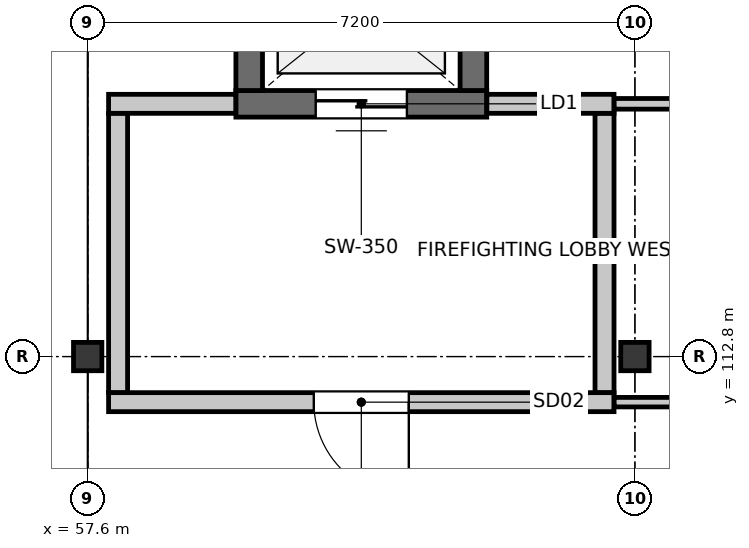
"""IFC4 building model, lengths in metres.
Left out: names, types, materials, properties, quantities, classifications, styles, units other than length and angle.
Written with IfcOpenShell. Run it as: python <this file> out.ifc"""

import sys

from ifc_helpers import new_model, si_unit, direction, frame, frame_2d, origin, origin_2d, place, context, subcontext, project, spatial, rectangle, i_section, extrude, element, fill, save


model = new_model("IFC4")
c1 = context("Model", 3, precision=1e-05, world=origin(), true_north=direction((0.0, 1.0)))
c2 = subcontext(c1, "Body", "Model", "MODEL_VIEW")
j1 = project(units=[si_unit("LENGTHUNIT", "METRE"), si_unit("PLANEANGLEUNIT", "RADIAN")], contexts=[c1])
p1 = place(None, origin())
s1 = spatial("IfcSite", under=j1, at=p1, CompositionType="ELEMENT")
p2 = place(p1, origin())
s2 = spatial("IfcBuilding", under=s1, at=p2, CompositionType="ELEMENT")
p3 = place(p2, frame((0.0, 0.0, 13.2)))
s3 = spatial("IfcBuildingStorey", under=s2, at=p3, CompositionType="ELEMENT", Elevation=13.2)
for number, where, z_axis, x_axis in (
    (1, (57.6, 112.8, 0.0), (0.0, 0.0, 1.0), (1.0, 0.0, 0.0)),
    (2, (64.8, 112.8, 0.0), (0.0, 0.0, 1.0), (1.0, 0.0, 0.0)),
):
    element("IfcColumn", number, at=place(p3, frame(where, z_axis=z_axis, x_axis=x_axis)), inside=s3, PredefinedType="COLUMN", context=c2, shape_type="SweptSolid", body=[
        extrude(i_section(OverallWidth=0.373, OverallDepth=0.373, WebThickness=0.016, FlangeThickness=0.026, FilletRadius=0.015, at=origin_2d()), origin(), (0.0, 0.0, 1.0), 3.9),
    ])
p4 = place(p3, frame((62.85, 116.125, 0.0), z_axis=(0.0, 0.0, 1.0), x_axis=(-1.0, 0.0, 0.0)))
e3 = element("IfcWall", 3, at=p4, inside=s3, PredefinedType="SHEAR", context=c2, shape_type="SweptSolid", body=[
    extrude(rectangle(XDim=3.3, YDim=0.35, at=frame_2d((1.65, 0.0))), origin(), (0.0, 0.0, 1.0), 3.66),
])
p5 = place(p4, frame((1.05, 0.0, 0.0)))
e4 = element("IfcOpeningElement", 4, at=p5, cuts=e3, PredefinedType="OPENING", context=c2, shape_type="SweptSolid", body=[
    extrude(rectangle(XDim=1.2, YDim=2.2, at=frame_2d((0.6, 1.1))), frame((0.0, 0.185, 0.0), z_axis=(0.0, -1.0, 0.0), x_axis=(1.0, 0.0, 0.0)), (0.0, 0.0, 1.0), 0.37),
])
for number, where, z_axis, x_axis in (
    (5, (59.725, 116.3, 0.0), (0.0, 0.0, 1.0), (0.0, 1.0, 0.0)),
    (6, (62.675, 118.5, 0.0), (0.0, 0.0, 1.0), (0.0, -1.0, 0.0)),
):
    element("IfcWall", number, at=place(p3, frame(where, z_axis=z_axis, x_axis=x_axis)), inside=s3, PredefinedType="SHEAR", context=c2, shape_type="SweptSolid", body=[
        extrude(rectangle(XDim=2.2, YDim=0.35, at=frame_2d((1.1, 0.0))), origin(), (0.0, 0.0, 1.0), 3.66),
    ])
p6 = place(p3, frame((64.525, 112.2, 0.0), z_axis=(0.0, 0.0, 1.0), x_axis=(-1.0, 0.0, 0.0)))
e7 = element("IfcWall", 7, at=p6, inside=s3, PredefinedType="PARTITIONING", context=c2, shape_type="SweptSolid", body=[
    extrude(rectangle(XDim=6.65, YDim=0.25, at=frame_2d((3.325, 0.0))), origin(), (0.0, 0.0, 1.0), 3.028),
])
p7 = place(p6, frame((2.7, 0.0, 0.0)))
e8 = element("IfcOpeningElement", 8, at=p7, cuts=e7, PredefinedType="OPENING", context=c2, shape_type="SweptSolid", body=[
    extrude(rectangle(XDim=1.25, YDim=2.2, at=frame_2d((0.625, 1.1))), frame((0.0, 0.135, 0.0), z_axis=(0.0, -1.0, 0.0), x_axis=(1.0, 0.0, 0.0)), (0.0, 0.0, 1.0), 0.27),
])
p8 = place(p3, frame((57.875, 116.125, 0.0), z_axis=(0.0, 0.0, 1.0), x_axis=(1.0, 0.0, 0.0)))
e9 = element("IfcWall", 9, at=p8, inside=s3, PredefinedType="PARTITIONING", context=c2, shape_type="SweptSolid", body=[
    extrude(rectangle(XDim=1.673, YDim=0.25, at=frame_2d((0.836, 0.0))), origin(), (0.0, 0.0, 1.0), 3.028),
])
p9 = place(p3, frame((62.852, 116.125, 0.0), z_axis=(0.0, 0.0, 1.0), x_axis=(1.0, 0.0, 0.0)))
e10 = element("IfcWall", 10, at=p9, inside=s3, PredefinedType="PARTITIONING", context=c2, shape_type="SweptSolid", body=[
    extrude(rectangle(XDim=1.673, YDim=0.25, at=frame_2d((0.836, 0.0))), origin(), (0.0, 0.0, 1.0), 3.028),
])
for number, where, z_axis, x_axis in (
    (11, (58.0, 112.327, 0.0), (0.0, 0.0, 1.0), (0.0, 1.0, 0.0)),
    (12, (64.4, 115.998, 0.0), (0.0, 0.0, 1.0), (0.0, -1.0, 0.0)),
):
    element("IfcWall", number, at=place(p3, frame(where, z_axis=z_axis, x_axis=x_axis)), inside=s3, PredefinedType="PARTITIONING", context=c2, shape_type="SweptSolid", body=[
        extrude(rectangle(XDim=3.671, YDim=0.25, at=frame_2d((1.835, 0.0))), origin(), (0.0, 0.0, 1.0), 3.028),
    ])
p10 = place(p3, frame((76.08, 112.2, 0.0), z_axis=(0.0, 0.0, 1.0), x_axis=(-1.0, 0.0, 0.0)))
e13 = element("IfcWall", 13, at=p10, inside=s3, PredefinedType="PARTITIONING", context=c2, shape_type="SweptSolid", body=[
    extrude(rectangle(XDim=11.553, YDim=0.125, at=frame_2d((5.776, 0.0))), origin(), (0.0, 0.0, 1.0), 3.028),
])
p11 = place(p10, frame((5.226, 0.0, 0.0)))
e14 = element("IfcOpeningElement", 14, at=p11, cuts=e13, PredefinedType="OPENING", context=c2, shape_type="SweptSolid", body=[
    extrude(rectangle(XDim=1.1, YDim=2.1, at=frame_2d((0.55, 1.05))), frame((0.0, 0.073, 0.0), z_axis=(0.0, -1.0, 0.0), x_axis=(1.0, 0.0, 0.0)), (0.0, 0.0, 1.0), 0.145),
])
p12 = place(p3, frame((64.527, 116.125, 0.0), z_axis=(0.0, 0.0, 1.0), x_axis=(1.0, 0.0, 0.0)))
e15 = element("IfcWall", 15, at=p12, inside=s3, PredefinedType="PARTITIONING", context=c2, shape_type="SweptSolid", body=[
    extrude(rectangle(XDim=11.553, YDim=0.14, at=frame_2d((5.776, 0.0))), origin(), (0.0, 0.0, 1.0), 3.028),
])
p13 = place(p5, origin())
e16 = element("IfcDoor", 16, at=p13, inside=s3, OperationType="DOUBLE_DOOR_SLIDING", PredefinedType="DOOR", context=c2, shape_type="SweptSolid", body=[
    extrude(rectangle(XDim=1.2, YDim=2.2, at=frame_2d((0.6, 1.1))), frame((0.0, 0.025, 0.0), z_axis=(0.0, -1.0, 0.0), x_axis=(1.0, 0.0, 0.0)), (0.0, 0.0, 1.0), 0.05),
])
fill(e4, e16)
p14 = place(p7, origin())
e17 = element("IfcDoor", 17, at=p14, inside=s3, OperationType="SINGLE_SWING_LEFT", PredefinedType="DOOR", context=c2, shape_type="SweptSolid", body=[
    extrude(rectangle(XDim=1.25, YDim=2.2, at=frame_2d((0.625, 1.1))), frame((0.0, 0.025, 0.0), z_axis=(0.0, -1.0, 0.0), x_axis=(1.0, 0.0, 0.0)), (0.0, 0.0, 1.0), 0.05),
])
fill(e8, e17)
save(model, sys.argv[1])
